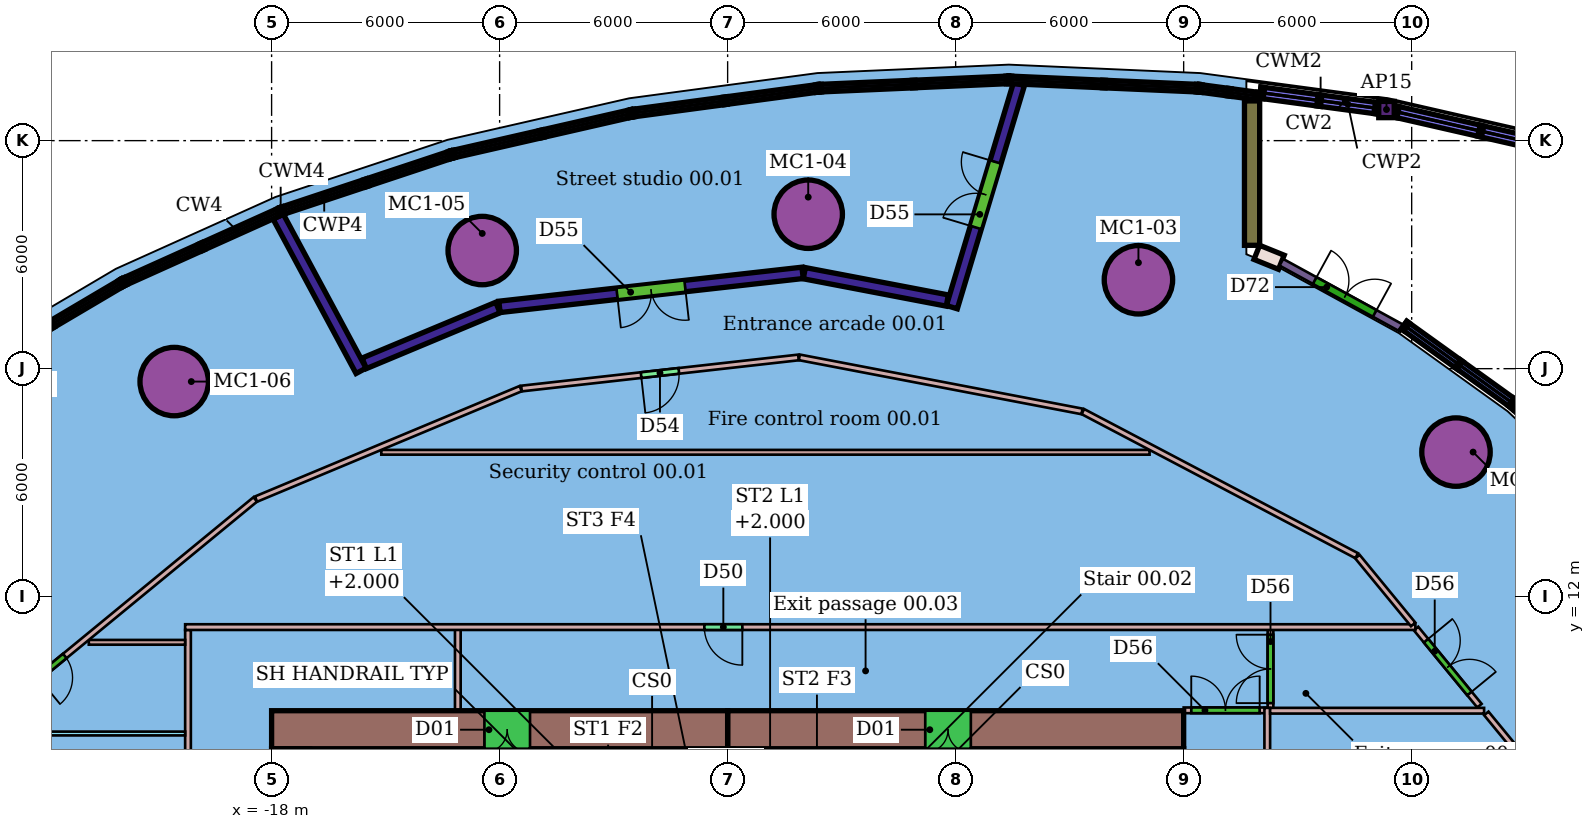
"""IFC4 building model, lengths in metres.
Left out: names, types, materials, properties, quantities, classifications, styles, units other than length and angle.
Written with IfcOpenShell. Run it as: python <this file> out.ifc"""

import sys

from ifc_helpers import new_model, si_unit, direction, frame, frame_2d, origin, origin_2d, place, context, subcontext, project, spatial, rectangle, hollow_circle, i_section, extrude, element, fill, save


model = new_model("IFC4")
c1 = context("Model", 3, precision=1e-05, world=origin(), true_north=direction((0.0, 1.0)))
c2 = subcontext(c1, "Body", "Model", "MODEL_VIEW")
j1 = project(units=[si_unit("LENGTHUNIT", "METRE"), si_unit("PLANEANGLEUNIT", "RADIAN")], contexts=[c1])
p1 = place(None, origin())
s1 = spatial("IfcSite", under=j1, at=p1, CompositionType="ELEMENT")
p2 = place(p1, origin())
s2 = spatial("IfcBuilding", under=s1, at=p2, CompositionType="ELEMENT")
p3 = place(p2, origin())
s3 = spatial("IfcBuildingStorey", under=s2, at=p3, CompositionType="ELEMENT", Elevation=0.0)
for number, where, z_axis, x_axis in (
    (1, (13.166, 15.805, -2.0), (0.0, 0.0, 1.0), (1.0, 0.0, 0.0)),
    (2, (4.81, 20.339, -2.0), (0.0, 0.0, 1.0), (1.0, 0.0, 0.0)),
    (3, (-3.879, 22.064, -2.0), (0.0, 0.0, 1.0), (1.0, 0.0, 0.0)),
    (4, (-12.458, 21.108, -2.0), (0.0, 0.0, 1.0), (1.0, 0.0, 0.0)),
    (5, (-20.563, 17.66, -2.0), (0.0, 0.0, 1.0), (1.0, 0.0, 0.0)),
):
    element("IfcColumn", number, at=place(p3, frame(where, z_axis=z_axis, x_axis=x_axis)), inside=s3, PredefinedType="COLUMN", context=c2, shape_type="SweptSolid", body=[
        extrude(hollow_circle(Radius=0.9, WallThickness=0.06, at=origin_2d()), origin(), (0.0, 0.0, 1.0), 9.8),
    ])
p4 = place(p3, frame((11.337, 24.819, -2.0), z_axis=(0.0, 0.0, 1.0), x_axis=(1.0, 0.0, 0.0)))
e6 = element("IfcColumn", 6, at=p4, inside=s3, PredefinedType="COLUMN", context=c2, shape_type="SweptSolid", body=[
    extrude(i_section(OverallWidth=0.407, OverallDepth=0.428, WebThickness=0.02, FlangeThickness=0.035, at=origin_2d()), origin(), (0.0, 0.0, 1.0), 9.8),
])
p5 = place(p3, frame((-20.2, -9.075, 0.0), z_axis=(0.0, 0.0, 1.0), x_axis=(0.0, 1.0, 0.0)))
e7 = element("IfcWall", 7, at=p5, inside=s3, PredefinedType="PARTITIONING", context=c2, shape_type="SweptSolid", body=[
    extrude(rectangle(XDim=20.2, YDim=0.15, at=frame_2d((10.1, 0.0))), origin(), (0.0, 0.0, 1.0), 7.35),
])
p6 = place(p3, frame((12.097, 11.2, 0.0), z_axis=(0.0, 0.0, 1.0), x_axis=(-1.0, 0.0, 0.0)))
e8 = element("IfcWall", 8, at=p6, inside=s3, PredefinedType="PARTITIONING", context=c2, shape_type="SweptSolid", body=[
    extrude(rectangle(XDim=32.372, YDim=0.15, at=frame_2d((16.186, 0.0))), origin(), (0.0, 0.0, 1.0), 7.35),
])
p7 = place(p6, frame((17.71, 0.0, 0.0)))
e9 = element("IfcOpeningElement", 9, at=p7, cuts=e8, PredefinedType="OPENING", context=c2, shape_type="SweptSolid", body=[
    extrude(rectangle(XDim=1.0, YDim=2.1, at=frame_2d((0.5, 1.05))), frame((0.0, 0.085, 0.0), z_axis=(0.0, -1.0, 0.0), x_axis=(1.0, 0.0, 0.0)), (0.0, 0.0, 1.0), 0.17),
])
p8 = place(p3, frame((8.2, -11.125, 0.0), z_axis=(0.0, 0.0, 1.0), x_axis=(0.0, 1.0, 0.0)))
e10 = element("IfcWall", 10, at=p8, inside=s3, PredefinedType="PARTITIONING", context=c2, shape_type="SweptSolid", body=[
    extrude(rectangle(XDim=20.2, YDim=0.15, at=frame_2d((10.1, 0.0))), origin(), (0.0, 0.0, 1.0), 7.35),
])
p9 = place(p3, frame((8.275, 9.0, 0.0), z_axis=(0.0, 0.0, 1.0), x_axis=(1.0, 0.0, 0.0)))
e11 = element("IfcWall", 11, at=p9, inside=s3, PredefinedType="PARTITIONING", context=c2, shape_type="SweptSolid", body=[
    extrude(rectangle(XDim=5.631, YDim=0.15, at=frame_2d((2.815, 0.0))), origin(), (0.0, 0.0, 1.0), 7.35),
])
p10 = place(p3, frame((-25.112, 8.4, 0.0), z_axis=(0.0, 0.0, 1.0), x_axis=(1.0, 0.0, 0.0)))
e12 = element("IfcWall", 12, at=p10, inside=s3, PredefinedType="PARTITIONING", context=c2, shape_type="SweptSolid", body=[
    extrude(rectangle(XDim=4.837, YDim=0.1, at=frame_2d((2.418, 0.0))), origin(), (0.0, 0.0, 1.0), 7.35),
])
p11 = place(p3, frame((-22.811, 10.8, 0.0), z_axis=(0.0, 0.0, 1.0), x_axis=(1.0, 0.0, 0.0)))
e13 = element("IfcWall", 13, at=p11, inside=s3, PredefinedType="PARTITIONING", context=c2, shape_type="SweptSolid", body=[
    extrude(rectangle(XDim=2.536, YDim=0.125, at=frame_2d((1.268, 0.0))), origin(), (0.0, 0.0, 1.0), 7.35),
])
p12 = place(p3, frame((-18.431, 14.559, 0.0), z_axis=(0.0, 0.0, 1.0), x_axis=(-0.772569565922, -0.634930126716, 0.0)))
e14 = element("IfcWall", 14, at=p12, inside=s3, PredefinedType="PARTITIONING", context=c2, shape_type="SweptSolid", body=[
    extrude(rectangle(XDim=8.053, YDim=0.15, at=frame_2d((4.026, 0.0))), origin(), (0.0, 0.0, 1.0), 7.35),
])
p13 = place(p12, frame((6.487, 0.0, 0.0)))
e15 = element("IfcOpeningElement", 15, at=p13, cuts=e14, PredefinedType="OPENING", context=c2, shape_type="SweptSolid", body=[
    extrude(rectangle(XDim=0.9, YDim=2.1, at=frame_2d((0.45, 1.05))), frame((0.0, 0.085, 0.0), z_axis=(0.0, -1.0, 0.0), x_axis=(1.0, 0.0, 0.0)), (0.0, 0.0, 1.0), 0.17),
])
p14 = place(p3, frame((-15.114, 15.8, 0.0), z_axis=(0.0, 0.0, 1.0), x_axis=(1.0, 0.0, 0.0)))
e16 = element("IfcWall", 16, at=p14, inside=s3, PredefinedType="PARTITIONING", context=c2, shape_type="SweptSolid", body=[
    extrude(rectangle(XDim=20.216, YDim=0.125, at=frame_2d((10.108, 0.0))), origin(), (0.0, 0.0, 1.0), 7.35),
])
p15 = place(p3, frame((-18.41, 14.568, 0.0), z_axis=(0.0, 0.0, 1.0), x_axis=(0.922821127206, 0.38522872061, 0.0)))
e17 = element("IfcWall", 17, at=p15, inside=s3, PredefinedType="PARTITIONING", context=c2, shape_type="SweptSolid", body=[
    extrude(rectangle(XDim=7.545, YDim=0.15, at=frame_2d((3.773, 0.0))), origin(), (0.0, 0.0, 1.0), 7.35),
])
p16 = place(p3, frame((3.348, 16.871, 0.0), z_axis=(0.0, 0.0, 1.0), x_axis=(0.884926027541, -0.46573160273, 0.0)))
e18 = element("IfcWall", 18, at=p16, inside=s3, PredefinedType="PARTITIONING", context=c2, shape_type="SweptSolid", body=[
    extrude(rectangle(XDim=8.142, YDim=0.15, at=frame_2d((4.071, 0.0))), origin(), (0.0, 0.0, 1.0), 7.35),
])
p17 = place(p3, frame((10.573, 13.054, 0.0), z_axis=(0.0, 0.0, 1.0), x_axis=(0.634980634047, -0.772528054109, 0.0)))
e19 = element("IfcWall", 19, at=p17, inside=s3, PredefinedType="PARTITIONING", context=c2, shape_type="SweptSolid", body=[
    extrude(rectangle(XDim=2.309, YDim=0.15, at=frame_2d((1.155, 0.0))), origin(), (0.0, 0.0, 1.0), 7.35),
])
p18 = place(p3, frame((13.964, 8.929, 0.0), z_axis=(0.0, 0.0, 1.0), x_axis=(0.635017397711, -0.772497834692, 0.0)))
e20 = element("IfcWall", 20, at=p18, inside=s3, PredefinedType="PARTITIONING", context=c2, shape_type="SweptSolid", body=[
    extrude(rectangle(XDim=3.09, YDim=0.15, at=frame_2d((1.545, 0.0))), origin(), (0.0, 0.0, 1.0), 7.35),
])
p19 = place(p3, frame((-4.137, 18.295, 0.0), z_axis=(0.0, 0.0, 1.0), x_axis=(-0.993762158865, -0.111520274427, 0.0)))
e21 = element("IfcWall", 21, at=p19, inside=s3, PredefinedType="PARTITIONING", context=c2, shape_type="SweptSolid", body=[
    extrude(rectangle(XDim=7.334, YDim=0.15, at=frame_2d((3.667, 0.0))), origin(), (0.0, 0.0, 1.0), 7.35),
])
p20 = place(p19, frame((3.167, 0.0, 0.0)))
e22 = element("IfcOpeningElement", 22, at=p20, cuts=e21, PredefinedType="OPENING", context=c2, shape_type="SweptSolid", body=[
    extrude(rectangle(XDim=1.0, YDim=2.1, at=frame_2d((0.5, 1.05))), frame((0.0, 0.085, 0.0), z_axis=(0.0, -1.0, 0.0), x_axis=(1.0, 0.0, 0.0)), (0.0, 0.0, 1.0), 0.17),
])
p21 = place(p3, frame((-4.114, 18.298, 0.0), z_axis=(0.0, 0.0, 1.0), x_axis=(0.982205706766, -0.187808278828, 0.0)))
e23 = element("IfcWall", 23, at=p21, inside=s3, PredefinedType="PARTITIONING", context=c2, shape_type="SweptSolid", body=[
    extrude(rectangle(XDim=7.573, YDim=0.15, at=frame_2d((3.787, 0.0))), origin(), (0.0, 0.0, 1.0), 7.35),
])
p22 = place(p3, frame((-0.099, 19.618, 0.0), z_axis=(0.0, 0.0, 1.0), x_axis=(0.288023764889, 0.957623261444, 0.0)))
e24 = element("IfcWall", 24, at=p22, inside=s3, PredefinedType="PARTITIONING", context=c2, shape_type="SweptSolid", body=[
    extrude(rectangle(XDim=6.13, YDim=0.3, at=frame_2d((3.065, 0.0))), origin(), (0.0, 0.0, 1.0), 7.35),
])
p23 = place(p22, frame((2.19, 0.0, 0.0)))
e25 = element("IfcOpeningElement", 25, at=p23, cuts=e24, PredefinedType="OPENING", context=c2, shape_type="SweptSolid", body=[
    extrude(rectangle(XDim=1.8, YDim=2.4, at=frame_2d((0.9, 1.2))), frame((0.0, 0.16, 0.0), z_axis=(0.0, -1.0, 0.0), x_axis=(1.0, 0.0, 0.0)), (0.0, 0.0, 1.0), 0.32),
])
p24 = place(p3, frame((-3.982, 20.512, 0.0), z_axis=(0.0, 0.0, 1.0), x_axis=(0.982202752117, -0.187823730484, 0.0)))
e26 = element("IfcWall", 26, at=p24, inside=s3, PredefinedType="PARTITIONING", context=c2, shape_type="SweptSolid", body=[
    extrude(rectangle(XDim=3.831, YDim=0.3, at=frame_2d((1.915, 0.0))), origin(), (0.0, 0.0, 1.0), 7.35),
])
p25 = place(p3, frame((-4.028, 20.521, 0.0), z_axis=(0.0, 0.0, 1.0), x_axis=(-0.993763335244, -0.11150979116, 0.0)))
e27 = element("IfcWall", 27, at=p25, inside=s3, PredefinedType="PARTITIONING", context=c2, shape_type="SweptSolid", body=[
    extrude(rectangle(XDim=8.026, YDim=0.3, at=frame_2d((4.013, 0.0))), origin(), (0.0, 0.0, 1.0), 7.35),
])
p26 = place(p25, frame((3.113, 0.0, 0.0)))
e28 = element("IfcOpeningElement", 28, at=p26, cuts=e27, PredefinedType="OPENING", context=c2, shape_type="SweptSolid", body=[
    extrude(rectangle(XDim=1.8, YDim=2.4, at=frame_2d((0.9, 1.2))), frame((0.0, 0.16, 0.0), z_axis=(0.0, -1.0, 0.0), x_axis=(1.0, 0.0, 0.0)), (0.0, 0.0, 1.0), 0.32),
])
p27 = place(p3, frame((-15.564, 18.14, 0.0), z_axis=(0.0, 0.0, 1.0), x_axis=(0.92281914683, 0.385233464596, 0.0)))
e29 = element("IfcWall", 29, at=p27, inside=s3, PredefinedType="PARTITIONING", context=c2, shape_type="SweptSolid", body=[
    extrude(rectangle(XDim=3.814, YDim=0.3, at=frame_2d((1.907, 0.0))), origin(), (0.0, 0.0, 1.0), 7.35),
])
p28 = place(p3, frame((-17.827, 22.002, 0.0), z_axis=(0.0, 0.0, 1.0), x_axis=(0.473429751336, -0.880831578992, 0.0)))
e30 = element("IfcWall", 30, at=p28, inside=s3, PredefinedType="PARTITIONING", context=c2, shape_type="SweptSolid", body=[
    extrude(rectangle(XDim=4.607, YDim=0.3, at=frame_2d((2.304, 0.0))), origin(), (0.0, 0.0, 1.0), 7.35),
])
p29 = place(p3, frame((7.925, 21.061, 0.0), z_axis=(0.0, 0.0, 1.0), x_axis=(0.927141159757, -0.374712249444, 0.0)))
e31 = element("IfcWall", 31, at=p29, inside=s3, PredefinedType="SOLIDWALL", context=c2, shape_type="SweptSolid", body=[
    extrude(rectangle(XDim=0.697, YDim=0.4, at=frame_2d((0.348, 0.0))), origin(), (0.0, 0.0, 1.0), 7.4),
])
p30 = place(p3, frame((8.571, 20.8, 0.0), z_axis=(0.0, 0.0, 1.0), x_axis=(0.87711318505, -0.48028372928, 0.0)))
e32 = element("IfcWall", 32, at=p30, inside=s3, PredefinedType="SOLIDWALL", context=c2, shape_type="SweptSolid", body=[
    extrude(rectangle(XDim=3.619, YDim=0.2, at=frame_2d((1.809, 0.0))), origin(), (0.0, 0.0, 1.0), 7.8),
])
p31 = place(p30, frame((1.001, 0.0, 0.0)))
e33 = element("IfcOpeningElement", 33, at=p31, cuts=e32, PredefinedType="OPENING", context=c2, shape_type="SweptSolid", body=[
    extrude(rectangle(XDim=1.8, YDim=2.4, at=frame_2d((0.9, 1.2))), frame((0.0, 0.11, 0.0), z_axis=(0.0, -1.0, 0.0), x_axis=(1.0, 0.0, 0.0)), (0.0, 0.0, 1.0), 0.22),
])
p32 = place(p3, frame((7.8, 25.045, 0.0), z_axis=(0.0, 0.0, 1.0), x_axis=(0.0, -1.0, 0.0)))
e34 = element("IfcWall", 34, at=p32, inside=s3, PredefinedType="SOLIDWALL", context=c2, shape_type="SweptSolid", body=[
    extrude(rectangle(XDim=3.799, YDim=0.4, at=frame_2d((1.9, 0.0))), origin(), (0.0, 0.0, 1.0), 7.8),
])
p33 = place(p3, frame((6.0, 8.5, -2.0), z_axis=(0.0, 0.0, 1.0), x_axis=(-1.0, 0.0, 0.0)))
e35 = element("IfcWall", 35, at=p33, inside=s3, PredefinedType="SHEAR", context=c2, shape_type="SweptSolid", body=[
    extrude(rectangle(XDim=12.0, YDim=1.0, at=frame_2d((6.0, 0.0))), origin(), (0.0, 0.0, 1.0), 9.7),
])
p34 = place(p33, frame((5.6, 0.0, 2.0)))
e36 = element("IfcOpeningElement", 36, at=p34, cuts=e35, PredefinedType="OPENING", context=c2, shape_type="SweptSolid", body=[
    extrude(rectangle(XDim=1.2, YDim=2.1, at=frame_2d((0.6, 1.05))), frame((0.0, 0.51, 0.0), z_axis=(0.0, -1.0, 0.0), x_axis=(1.0, 0.0, 0.0)), (0.0, 0.0, 1.0), 1.02),
])
p35 = place(p3, frame((-6.0, 8.5, -2.0), z_axis=(0.0, 0.0, 1.0), x_axis=(-1.0, 0.0, 0.0)))
e37 = element("IfcWall", 37, at=p35, inside=s3, PredefinedType="SHEAR", context=c2, shape_type="SweptSolid", body=[
    extrude(rectangle(XDim=12.0, YDim=1.0, at=frame_2d((6.0, 0.0))), origin(), (0.0, 0.0, 1.0), 9.7),
])
p36 = place(p35, frame((5.2, 0.0, 2.0)))
e38 = element("IfcOpeningElement", 38, at=p36, cuts=e37, PredefinedType="OPENING", context=c2, shape_type="SweptSolid", body=[
    extrude(rectangle(XDim=1.2, YDim=2.1, at=frame_2d((0.6, 1.05))), frame((0.0, 0.51, 0.0), z_axis=(0.0, -1.0, 0.0), x_axis=(1.0, 0.0, 0.0)), (0.0, 0.0, 1.0), 1.02),
])
p37 = place(p3, frame((-13.1, 9.0, 0.0), z_axis=(0.0, 0.0, 1.0), x_axis=(0.0, 1.0, 0.0)))
e39 = element("IfcWall", 39, at=p37, inside=s3, PredefinedType="PARTITIONING", context=c2, shape_type="SweptSolid", body=[
    extrude(rectangle(XDim=2.2, YDim=0.15, at=frame_2d((1.1, 0.0))), origin(), (0.0, 0.0, 1.0), 7.35),
])
p38 = place(p3, frame((8.285, 9.0, 0.0), z_axis=(0.0, 0.0, 1.0), x_axis=(0.0, 1.0, 0.0)))
e40 = element("IfcWall", 40, at=p38, inside=s3, PredefinedType="PARTITIONING", context=c2, shape_type="SweptSolid", body=[
    extrude(rectangle(XDim=2.2, YDim=0.15, at=frame_2d((1.1, 0.0))), origin(), (0.0, 0.0, 1.0), 7.35),
])
p39 = place(p38, frame((0.2, 0.0, 0.0)))
e41 = element("IfcOpeningElement", 41, at=p39, cuts=e40, PredefinedType="OPENING", context=c2, shape_type="SweptSolid", body=[
    extrude(rectangle(XDim=1.8, YDim=2.4, at=frame_2d((0.9, 1.2))), frame((0.0, 0.085, 0.0), z_axis=(0.0, -1.0, 0.0), x_axis=(1.0, 0.0, 0.0)), (0.0, 0.0, 1.0), 0.17),
])
p40 = place(p3, frame((12.115, 11.163, 0.0), z_axis=(0.0, 0.0, 1.0), x_axis=(0.63506228811, -0.772460931193, 0.0)))
e42 = element("IfcWall", 42, at=p40, inside=s3, PredefinedType="PARTITIONING", context=c2, shape_type="SweptSolid", body=[
    extrude(rectangle(XDim=2.628, YDim=0.15, at=frame_2d((1.314, 0.0))), origin(), (0.0, 0.0, 1.0), 7.35),
])
p41 = place(p40, frame((0.414, 0.0, 0.0)))
e43 = element("IfcOpeningElement", 43, at=p41, cuts=e42, PredefinedType="OPENING", context=c2, shape_type="SweptSolid", body=[
    extrude(rectangle(XDim=1.8, YDim=2.4, at=frame_2d((0.9, 1.2))), frame((0.0, 0.085, 0.0), z_axis=(0.0, -1.0, 0.0), x_axis=(1.0, 0.0, 0.0)), (0.0, 0.0, 1.0), 0.17),
])
p42 = place(p3, frame((6.0, 9.01, 0.0), z_axis=(0.0, 0.0, 1.0), x_axis=(1.0, 0.0, 0.0)))
e44 = element("IfcWall", 44, at=p42, inside=s3, PredefinedType="PARTITIONING", context=c2, shape_type="SweptSolid", body=[
    extrude(rectangle(XDim=2.2, YDim=0.15, at=frame_2d((1.1, 0.0))), origin(), (0.0, 0.0, 1.0), 7.35),
])
p43 = place(p42, frame((0.2, 0.0, 0.0)))
e45 = element("IfcOpeningElement", 45, at=p43, cuts=e44, PredefinedType="OPENING", context=c2, shape_type="SweptSolid", body=[
    extrude(rectangle(XDim=1.8, YDim=2.4, at=frame_2d((0.9, 1.2))), frame((0.0, 0.085, 0.0), z_axis=(0.0, -1.0, 0.0), x_axis=(1.0, 0.0, 0.0)), (0.0, 0.0, 1.0), 0.17),
])
p44 = place(p7, origin())
e46 = element("IfcDoor", 46, at=p44, inside=s3, OperationType="SINGLE_SWING_LEFT", PredefinedType="DOOR", context=c2, shape_type="SweptSolid", body=[
    extrude(rectangle(XDim=1.0, YDim=2.1, at=frame_2d((0.5, 1.05))), frame((0.0, 0.025, 0.0), z_axis=(0.0, -1.0, 0.0), x_axis=(1.0, 0.0, 0.0)), (0.0, 0.0, 1.0), 0.05),
])
fill(e9, e46)
p45 = place(p13, origin())
e47 = element("IfcDoor", 47, at=p45, inside=s3, OperationType="SINGLE_SWING_RIGHT", PredefinedType="DOOR", context=c2, shape_type="SweptSolid", body=[
    extrude(rectangle(XDim=0.9, YDim=2.1, at=frame_2d((0.45, 1.05))), frame((0.0, 0.025, 0.0), z_axis=(0.0, -1.0, 0.0), x_axis=(1.0, 0.0, 0.0)), (0.0, 0.0, 1.0), 0.05),
])
fill(e15, e47)
p46 = place(p20, origin())
e48 = element("IfcDoor", 48, at=p46, inside=s3, OperationType="SINGLE_SWING_RIGHT", PredefinedType="DOOR", context=c2, shape_type="SweptSolid", body=[
    extrude(rectangle(XDim=1.0, YDim=2.1, at=frame_2d((0.5, 1.05))), frame((0.0, 0.025, 0.0), z_axis=(0.0, -1.0, 0.0), x_axis=(1.0, 0.0, 0.0)), (0.0, 0.0, 1.0), 0.05),
])
fill(e22, e48)
p47 = place(p23, origin())
e49 = element("IfcDoor", 49, at=p47, inside=s3, OperationType="DOUBLE_DOOR_SINGLE_SWING", PredefinedType="DOOR", context=c2, shape_type="SweptSolid", body=[
    extrude(rectangle(XDim=1.8, YDim=2.4, at=frame_2d((0.9, 1.2))), frame((0.0, 0.025, 0.0), z_axis=(0.0, -1.0, 0.0), x_axis=(1.0, 0.0, 0.0)), (0.0, 0.0, 1.0), 0.05),
])
fill(e25, e49)
p48 = place(p26, origin())
e50 = element("IfcDoor", 50, at=p48, inside=s3, OperationType="DOUBLE_DOOR_SINGLE_SWING", PredefinedType="DOOR", context=c2, shape_type="SweptSolid", body=[
    extrude(rectangle(XDim=1.8, YDim=2.4, at=frame_2d((0.9, 1.2))), frame((0.0, 0.025, 0.0), z_axis=(0.0, -1.0, 0.0), x_axis=(1.0, 0.0, 0.0)), (0.0, 0.0, 1.0), 0.05),
])
fill(e28, e50)
p49 = place(p31, origin())
e51 = element("IfcDoor", 51, at=p49, inside=s3, OperationType="DOUBLE_DOOR_SINGLE_SWING", PredefinedType="DOOR", context=c2, shape_type="SweptSolid", body=[
    extrude(rectangle(XDim=1.8, YDim=2.4, at=frame_2d((0.9, 1.2))), frame((0.0, 0.025, 0.0), z_axis=(0.0, -1.0, 0.0), x_axis=(1.0, 0.0, 0.0)), (0.0, 0.0, 1.0), 0.05),
])
fill(e33, e51)
p50 = place(p34, origin())
e52 = element("IfcDoor", 52, at=p50, inside=s3, OperationType="DOUBLE_DOOR_SINGLE_SWING", PredefinedType="NOTDEFINED", context=c2, shape_type="SweptSolid", body=[
    extrude(rectangle(XDim=1.2, YDim=2.1, at=frame_2d((0.6, 1.05))), frame((0.0, 0.025, 0.0), z_axis=(0.0, -1.0, 0.0), x_axis=(1.0, 0.0, 0.0)), (0.0, 0.0, 1.0), 0.05),
])
fill(e36, e52)
p51 = place(p36, origin())
e53 = element("IfcDoor", 53, at=p51, inside=s3, OperationType="DOUBLE_DOOR_SINGLE_SWING", PredefinedType="NOTDEFINED", context=c2, shape_type="SweptSolid", body=[
    extrude(rectangle(XDim=1.2, YDim=2.1, at=frame_2d((0.6, 1.05))), frame((0.0, 0.025, 0.0), z_axis=(0.0, -1.0, 0.0), x_axis=(1.0, 0.0, 0.0)), (0.0, 0.0, 1.0), 0.05),
])
fill(e38, e53)
p52 = place(p43, origin())
e54 = element("IfcDoor", 54, at=p52, inside=s3, OperationType="DOUBLE_DOOR_SINGLE_SWING", PredefinedType="DOOR", context=c2, shape_type="SweptSolid", body=[
    extrude(rectangle(XDim=1.8, YDim=2.4, at=frame_2d((0.9, 1.2))), frame((0.0, 0.025, 0.0), z_axis=(0.0, -1.0, 0.0), x_axis=(1.0, 0.0, 0.0)), (0.0, 0.0, 1.0), 0.05),
])
fill(e45, e54)
p53 = place(p39, origin())
e55 = element("IfcDoor", 55, at=p53, inside=s3, OperationType="DOUBLE_DOOR_SINGLE_SWING", PredefinedType="DOOR", context=c2, shape_type="SweptSolid", body=[
    extrude(rectangle(XDim=1.8, YDim=2.4, at=frame_2d((0.9, 1.2))), frame((0.0, 0.025, 0.0), z_axis=(0.0, -1.0, 0.0), x_axis=(1.0, 0.0, 0.0)), (0.0, 0.0, 1.0), 0.05),
])
fill(e41, e55)
p54 = place(p41, origin())
e56 = element("IfcDoor", 56, at=p54, inside=s3, OperationType="DOUBLE_DOOR_SINGLE_SWING", PredefinedType="DOOR", context=c2, shape_type="SweptSolid", body=[
    extrude(rectangle(XDim=1.8, YDim=2.4, at=frame_2d((0.9, 1.2))), frame((0.0, 0.025, 0.0), z_axis=(0.0, -1.0, 0.0), x_axis=(1.0, 0.0, 0.0)), (0.0, 0.0, 1.0), 0.05),
])
fill(e43, e56)
save(model, sys.argv[1])
